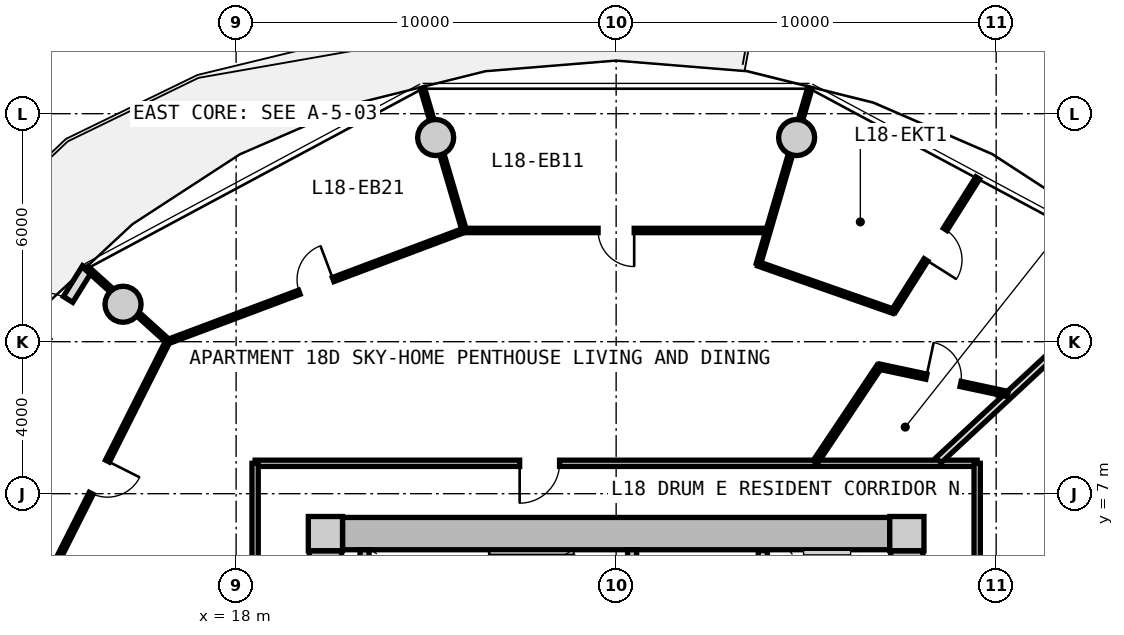
"""IFC4 building model, lengths in metres.
Left out: names, types, materials, properties, quantities, classifications, styles, units other than length and angle.
Written with IfcOpenShell. Run it as: python <this file> out.ifc"""

import sys

from ifc_helpers import new_model, si_unit, direction, frame, frame_2d, origin, origin_2d, place, context, subcontext, project, spatial, rectangle, circle, extrude, source, transform, mapped, element, fill, save


model = new_model("IFC4")
c1 = context("Model", 3, precision=1e-05, world=origin(), true_north=direction((0.0, 1.0)))
c2 = subcontext(c1, "Body", "Model", "MODEL_VIEW")
j1 = project(units=[si_unit("LENGTHUNIT", "METRE"), si_unit("PLANEANGLEUNIT", "RADIAN")], contexts=[c1])
p1 = place(None, origin())
s1 = spatial("IfcSite", under=j1, at=p1, CompositionType="ELEMENT")
p2 = place(p1, origin())
s2 = spatial("IfcBuilding", under=s1, at=p2, CompositionType="ELEMENT")
p3 = place(p2, frame((0.0, 0.0, 61.25)))
s3 = spatial("IfcBuildingStorey", under=s2, at=p3, CompositionType="ELEMENT", Elevation=61.25)
m1 = source(origin(), c2, "Body", "SweptSolid", [
    extrude(rectangle(XDim=0.9, YDim=0.9, at=origin_2d()), origin(), (0.0, 0.0, 1.0), 3.05),
])
for number, where, z_axis, x_axis in (
    (1, (35.65, 5.95, 0.0), (0.0, 0.0, 1.0), (1.0, 0.0, 0.0)),
    (2, (20.35, 5.95, 0.0), (0.0, 0.0, 1.0), (1.0, 0.0, 0.0)),
):
    element("IfcColumn", number, at=place(p3, frame(where, z_axis=z_axis, x_axis=x_axis)), inside=s3, PredefinedType="COLUMN", context=c2, shape_type="MappedRepresentation", body=[
        mapped(m1, transform((0.0, 0.0, 0.0), x_axis=(1.0, 0.0, 0.0), y_axis=(0.0, 1.0, 0.0), z_axis=(0.0, 0.0, 1.0), scale=1.0)),
    ])
m2 = source(origin(), c2, "Body", "SweptSolid", [
    extrude(rectangle(XDim=14.4, YDim=0.85, at=frame_2d((7.2, 0.0))), origin(), (0.0, 0.0, 1.0), 2.79),
])
p4 = place(p3, frame((20.8, 5.95, 0.0), z_axis=(0.0, 0.0, 1.0), x_axis=(1.0, 0.0, 0.0)))
e3 = element("IfcWall", 3, at=p4, inside=s3, PredefinedType="SHEAR", context=c2, shape_type="MappedRepresentation", body=[
    mapped(m2, transform((0.0, 0.0, 0.0), x_axis=(1.0, 0.0, 0.0), y_axis=(0.0, 1.0, 0.0), z_axis=(0.0, 0.0, 1.0), scale=1.0)),
])
m3 = source(origin(), c2, "Body", "SweptSolid", [
    extrude(rectangle(XDim=11.0, YDim=0.85, at=frame_2d((5.5, 0.0))), origin(), (0.0, 0.0, 1.0), 2.79),
])
p5 = place(p3, frame((20.35, -5.5, 0.0), z_axis=(0.0, 0.0, 1.0), x_axis=(0.0, 1.0, 0.0)))
e4 = element("IfcWall", 4, at=p5, inside=s3, PredefinedType="SHEAR", context=c2, shape_type="MappedRepresentation", body=[
    mapped(m3, transform((0.0, 0.0, 0.0), x_axis=(1.0, 0.0, 0.0), y_axis=(0.0, 1.0, 0.0), z_axis=(0.0, 0.0, 1.0), scale=1.0)),
])
p6 = place(p5, frame((3.8, 0.0, 0.0)))
e5 = element("IfcOpeningElement", 5, at=p6, cuts=e4, PredefinedType="OPENING", context=c2, shape_type="SweptSolid", body=[
    extrude(rectangle(XDim=1.2, YDim=2.15, at=frame_2d((0.6, 1.075))), frame((0.0, 0.435, 0.0), z_axis=(0.0, -1.0, 0.0), x_axis=(1.0, 0.0, 0.0)), (0.0, 0.0, 1.0), 0.87),
])
p7 = place(p3, frame((35.65, 5.5, 0.0), z_axis=(0.0, 0.0, 1.0), x_axis=(0.0, -1.0, 0.0)))
e6 = element("IfcWall", 6, at=p7, inside=s3, PredefinedType="SHEAR", context=c2, shape_type="MappedRepresentation", body=[
    mapped(m3, transform((0.0, 0.0, 0.0), x_axis=(1.0, 0.0, 0.0), y_axis=(0.0, 1.0, 0.0), z_axis=(0.0, 0.0, 1.0), scale=1.0)),
])
p8 = place(p7, frame((5.65, 0.0, 0.0)))
e7 = element("IfcOpeningElement", 7, at=p8, cuts=e6, PredefinedType="OPENING", context=c2, shape_type="SweptSolid", body=[
    extrude(rectangle(XDim=1.2, YDim=2.15, at=frame_2d((0.6, 1.075))), frame((0.0, 0.435, 0.0), z_axis=(0.0, -1.0, 0.0), x_axis=(1.0, 0.0, 0.0)), (0.0, 0.0, 1.0), 0.87),
])
m4 = source(origin(), c2, "Body", "SweptSolid", [
    extrude(circle(Radius=0.475, at=origin_2d()), origin(), (0.0, 0.0, 1.0), 3.05),
])
for number, where, z_axis, x_axis in (
    (8, (32.749, 16.373, 0.0), (0.0, 0.0, 1.0), (1.0, 0.0, 0.0)),
    (9, (23.251, 16.373, 0.0), (0.0, 0.0, 1.0), (1.0, 0.0, 0.0)),
    (10, (15.025, 11.985, 0.0), (0.0, 0.0, 1.0), (1.0, 0.0, 0.0)),
):
    element("IfcColumn", number, at=place(p3, frame(where, z_axis=z_axis, x_axis=x_axis)), inside=s3, PredefinedType="COLUMN", context=c2, shape_type="MappedRepresentation", body=[
        mapped(m4, transform((0.0, 0.0, 0.0), x_axis=(1.0, 0.0, 0.0), y_axis=(0.0, 1.0, 0.0), z_axis=(0.0, 0.0, 1.0), scale=1.0)),
    ])
m5 = source(origin(), c2, "Body", "SweptSolid", [
    extrude(rectangle(XDim=9.649, YDim=0.29, at=frame_2d((4.824, 0.0))), origin(), (0.0, 0.0, 1.0), 2.79),
])
p9 = place(p3, frame((8.99, 4.731, 0.0), z_axis=(0.0, 0.0, 1.0), x_axis=(0.527909458386, 0.849300655684, 0.0)))
e11 = element("IfcWall", 11, at=p9, inside=s3, PredefinedType="SOLIDWALL", context=c2, shape_type="MappedRepresentation", body=[
    mapped(m5, transform((0.0, 0.0, 0.0), x_axis=(1.0, 0.0, 0.0), y_axis=(0.0, 1.0, 0.0), z_axis=(0.0, 0.0, 1.0), scale=1.0)),
])
p10 = place(p9, frame((7.54, 0.0, 0.0)))
e12 = element("IfcOpeningElement", 12, at=p10, cuts=e11, PredefinedType="OPENING", context=c2, shape_type="SweptSolid", body=[
    extrude(rectangle(XDim=1.15, YDim=2.25, at=frame_2d((0.575, 1.125))), frame((0.0, 0.155, 0.0), z_axis=(0.0, -1.0, 0.0), x_axis=(1.0, 0.0, 0.0)), (0.0, 0.0, 1.0), 0.31),
])
p11 = place(p9, frame((0.85, 0.0, 0.85)))
e13 = element("IfcOpeningElement", 13, at=p11, cuts=e11, PredefinedType="OPENING", context=c2, shape_type="SweptSolid", body=[
    extrude(rectangle(XDim=1.2, YDim=1.5, at=frame_2d((0.6, 0.75))), frame((0.0, 0.155, 0.0), z_axis=(0.0, -1.0, 0.0), x_axis=(1.0, 0.0, 0.0)), (0.0, 0.0, 1.0), 0.31),
])
m6 = source(origin(), c2, "Body", "SweptSolid", [
    extrude(rectangle(XDim=3.075, YDim=0.24, at=frame_2d((1.538, 0.0))), origin(), (0.0, 0.0, 1.0), 2.79),
])
p12 = place(p3, frame((21.38, 2.45, 0.0), z_axis=(0.0, 0.0, 1.0), x_axis=(0.0, 1.0, 0.0)))
e14 = element("IfcWall", 14, at=p12, inside=s3, PredefinedType="PARTITIONING", context=c2, shape_type="MappedRepresentation", body=[
    mapped(m6, transform((0.0, 0.0, 0.0), x_axis=(1.0, 0.0, 0.0), y_axis=(0.0, 1.0, 0.0), z_axis=(0.0, 0.0, 1.0), scale=1.0)),
])
p13 = place(p3, frame((28.42, 2.45, 0.0), z_axis=(0.0, 0.0, 1.0), x_axis=(0.0, 1.0, 0.0)))
e15 = element("IfcWall", 15, at=p13, inside=s3, PredefinedType="PARTITIONING", context=c2, shape_type="MappedRepresentation", body=[
    mapped(m6, transform((0.0, 0.0, 0.0), x_axis=(1.0, 0.0, 0.0), y_axis=(0.0, 1.0, 0.0), z_axis=(0.0, 0.0, 1.0), scale=1.0)),
])
p14 = place(p13, frame((0.55, 0.0, 0.0)))
e16 = element("IfcOpeningElement", 16, at=p14, cuts=e15, PredefinedType="OPENING", context=c2, shape_type="SweptSolid", body=[
    extrude(rectangle(XDim=1.1, YDim=2.15, at=frame_2d((0.55, 1.075))), frame((0.0, 0.13, 0.0), z_axis=(0.0, -1.0, 0.0), x_axis=(1.0, 0.0, 0.0)), (0.0, 0.0, 1.0), 0.26),
])
m7 = source(origin(), c2, "Body", "SweptSolid", [
    extrude(rectangle(XDim=5.0, YDim=0.24, at=frame_2d((2.5, 0.0))), origin(), (0.0, 0.0, 1.0), 2.775),
])
p15 = place(p3, frame((31.86, 0.5, 0.0), z_axis=(0.0, 0.0, 1.0), x_axis=(0.0, 1.0, 0.0)))
e17 = element("IfcWall", 17, at=p15, inside=s3, PredefinedType="PARTITIONING", context=c2, shape_type="MappedRepresentation", body=[
    mapped(m7, transform((0.0, 0.0, 0.0), x_axis=(1.0, 0.0, 0.0), y_axis=(0.0, 1.0, 0.0), z_axis=(0.0, 0.0, 1.0), scale=1.0)),
])
p16 = place(p15, frame((3.05, 0.0, 0.0)))
e18 = element("IfcOpeningElement", 18, at=p16, cuts=e17, PredefinedType="OPENING", context=c2, shape_type="SweptSolid", body=[
    extrude(rectangle(XDim=1.3, YDim=2.2, at=frame_2d((0.65, 1.1))), frame((0.0, 0.13, 0.0), z_axis=(0.0, -1.0, 0.0), x_axis=(1.0, 0.0, 0.0)), (0.0, 0.0, 1.0), 0.26),
])
p17 = place(p15, frame((0.55, 0.0, 0.0)))
e19 = element("IfcOpeningElement", 19, at=p17, cuts=e17, PredefinedType="OPENING", context=c2, shape_type="SweptSolid", body=[
    extrude(rectangle(XDim=1.3, YDim=2.2, at=frame_2d((0.65, 1.1))), frame((0.0, 0.13, 0.0), z_axis=(0.0, -1.0, 0.0), x_axis=(1.0, 0.0, 0.0)), (0.0, 0.0, 1.0), 0.26),
])
m8 = source(origin(), c2, "Body", "SweptSolid", [
    extrude(rectangle(XDim=19.0, YDim=0.165, at=frame_2d((9.5, 0.0))), origin(), (0.0, 0.0, 1.0), 2.775),
])
p18 = place(p3, frame((18.5, 7.8, 0.0), z_axis=(0.0, 0.0, 1.0), x_axis=(1.0, 0.0, 0.0)))
e20 = element("IfcWall", 20, at=p18, inside=s3, PredefinedType="PARTITIONING", context=c2, shape_type="MappedRepresentation", body=[
    mapped(m8, transform((0.0, 0.0, 0.0), x_axis=(1.0, 0.0, 0.0), y_axis=(0.0, 1.0, 0.0), z_axis=(0.0, 0.0, 1.0), scale=1.0)),
])
p19 = place(p18, frame((6.961, 0.0, 0.0)))
e21 = element("IfcOpeningElement", 21, at=p19, cuts=e20, PredefinedType="OPENING", context=c2, shape_type="SweptSolid", body=[
    extrude(rectangle(XDim=1.05, YDim=2.15, at=frame_2d((0.525, 1.075))), frame((0.0, 0.093, 0.0), z_axis=(0.0, -1.0, 0.0), x_axis=(1.0, 0.0, 0.0)), (0.0, 0.0, 1.0), 0.185),
])
m9 = source(origin(), c2, "Body", "SweptSolid", [
    extrude(rectangle(XDim=15.6, YDim=0.165, at=frame_2d((7.8, 0.0))), origin(), (0.0, 0.0, 1.0), 2.775),
])
p20 = place(p3, frame((18.5, -7.8, 0.0), z_axis=(0.0, 0.0, 1.0), x_axis=(0.0, 1.0, 0.0)))
e22 = element("IfcWall", 22, at=p20, inside=s3, PredefinedType="PARTITIONING", context=c2, shape_type="MappedRepresentation", body=[
    mapped(m9, transform((0.0, 0.0, 0.0), x_axis=(1.0, 0.0, 0.0), y_axis=(0.0, 1.0, 0.0), z_axis=(0.0, 0.0, 1.0), scale=1.0)),
])
p21 = place(p20, frame((3.63, 0.0, 0.0)))
e23 = element("IfcOpeningElement", 23, at=p21, cuts=e22, PredefinedType="OPENING", context=c2, shape_type="SweptSolid", body=[
    extrude(rectangle(XDim=1.05, YDim=2.15, at=frame_2d((0.525, 1.075))), frame((0.0, 0.093, 0.0), z_axis=(0.0, -1.0, 0.0), x_axis=(1.0, 0.0, 0.0)), (0.0, 0.0, 1.0), 0.185),
])
p22 = place(p3, frame((37.5, 7.8, 0.0), z_axis=(0.0, 0.0, 1.0), x_axis=(0.0, -1.0, 0.0)))
e24 = element("IfcWall", 24, at=p22, inside=s3, PredefinedType="PARTITIONING", context=c2, shape_type="MappedRepresentation", body=[
    mapped(m9, transform((0.0, 0.0, 0.0), x_axis=(1.0, 0.0, 0.0), y_axis=(0.0, 1.0, 0.0), z_axis=(0.0, 0.0, 1.0), scale=1.0)),
])
p23 = place(p22, frame((7.275, 0.0, 0.0)))
e25 = element("IfcOpeningElement", 25, at=p23, cuts=e24, PredefinedType="OPENING", context=c2, shape_type="SweptSolid", body=[
    extrude(rectangle(XDim=1.05, YDim=2.15, at=frame_2d((0.525, 1.075))), frame((0.0, 0.093, 0.0), z_axis=(0.0, -1.0, 0.0), x_axis=(1.0, 0.0, 0.0)), (0.0, 0.0, 1.0), 0.185),
])
m10 = source(origin(), c2, "Body", "SweptSolid", [
    extrude(rectangle(XDim=7.435, YDim=0.19, at=frame_2d((3.717, 0.0))), origin(), (0.0, 0.0, 1.0), 2.225),
])
p24 = place(p3, frame((36.483, 7.88, 0.0), z_axis=(0.0, 0.0, 1.0), x_axis=(0.732651956848, 0.680603489652, 0.0)))
e26 = element("IfcWall", 26, at=p24, inside=s3, PredefinedType="PARTITIONING", context=c2, shape_type="MappedRepresentation", body=[
    mapped(m10, transform((0.0, 0.0, 0.0), x_axis=(1.0, 0.0, 0.0), y_axis=(0.0, 1.0, 0.0), z_axis=(0.0, 0.0, 1.0), scale=1.0)),
])
m11 = source(origin(), c2, "Body", "SweptSolid", [
    extrude(rectangle(XDim=7.993, YDim=0.115, at=frame_2d((3.996, 0.0))), origin(), (0.0, 0.0, 1.0), 2.775),
])
p25 = place(p3, frame((31.996, 13.927, 0.0), z_axis=(0.0, 0.0, 1.0), x_axis=(-1.0, 0.0, 0.0)))
e27 = element("IfcWall", 27, at=p25, inside=s3, PredefinedType="PARTITIONING", context=c2, shape_type="MappedRepresentation", body=[
    mapped(m11, transform((0.0, 0.0, 0.0), x_axis=(1.0, 0.0, 0.0), y_axis=(0.0, 1.0, 0.0), z_axis=(0.0, 0.0, 1.0), scale=1.0)),
])
p26 = place(p25, frame((3.521, 0.0, 0.0)))
e28 = element("IfcOpeningElement", 28, at=p26, cuts=e27, PredefinedType="OPENING", context=c2, shape_type="SweptSolid", body=[
    extrude(rectangle(XDim=0.95, YDim=2.1, at=frame_2d((0.475, 1.05))), frame((0.0, 0.067, 0.0), z_axis=(0.0, -1.0, 0.0), x_axis=(1.0, 0.0, 0.0)), (0.0, 0.0, 1.0), 0.135),
])
m12 = source(origin(), c2, "Body", "SweptSolid", [
    extrude(rectangle(XDim=4.829, YDim=0.115, at=frame_2d((2.415, 0.0))), origin(), (0.0, 0.0, 1.0), 2.225),
])
p27 = place(p3, frame((31.742, 13.042, 0.0), z_axis=(0.0, 0.0, 1.0), x_axis=(0.280838556456, 0.959755023539, 0.0)))
e29 = element("IfcWall", 29, at=p27, inside=s3, PredefinedType="PARTITIONING", context=c2, shape_type="MappedRepresentation", body=[
    mapped(m12, transform((0.0, 0.0, 0.0), x_axis=(1.0, 0.0, 0.0), y_axis=(0.0, 1.0, 0.0), z_axis=(0.0, 0.0, 1.0), scale=1.0)),
])
m13 = source(origin(), c2, "Body", "SweptSolid", [
    extrude(rectangle(XDim=8.32, YDim=0.115, at=frame_2d((4.16, 0.0))), origin(), (0.0, 0.0, 1.0), 2.775),
])
p28 = place(p3, frame((24.003, 13.93, 0.0), z_axis=(0.0, 0.0, 1.0), x_axis=(-0.936180763098, -0.351518959382, 0.0)))
e30 = element("IfcWall", 30, at=p28, inside=s3, PredefinedType="PARTITIONING", context=c2, shape_type="MappedRepresentation", body=[
    mapped(m13, transform((0.0, 0.0, 0.0), x_axis=(1.0, 0.0, 0.0), y_axis=(0.0, 1.0, 0.0), z_axis=(0.0, 0.0, 1.0), scale=1.0)),
])
p29 = place(p28, frame((3.685, 0.0, 0.0)))
e31 = element("IfcOpeningElement", 31, at=p29, cuts=e30, PredefinedType="OPENING", context=c2, shape_type="SweptSolid", body=[
    extrude(rectangle(XDim=0.95, YDim=2.1, at=frame_2d((0.475, 1.05))), frame((0.0, 0.067, 0.0), z_axis=(0.0, -1.0, 0.0), x_axis=(1.0, 0.0, 0.0)), (0.0, 0.0, 1.0), 0.135),
])
m14 = source(origin(), c2, "Body", "SweptSolid", [
    extrude(rectangle(XDim=3.905, YDim=0.115, at=frame_2d((1.952, 0.0))), origin(), (0.0, 0.0, 1.0), 2.225),
])
p30 = place(p3, frame((24.003, 13.93, 0.0), z_axis=(0.0, 0.0, 1.0), x_axis=(-0.282037692958, 0.959403324859, 0.0)))
e32 = element("IfcWall", 32, at=p30, inside=s3, PredefinedType="PARTITIONING", context=c2, shape_type="MappedRepresentation", body=[
    mapped(m14, transform((0.0, 0.0, 0.0), x_axis=(1.0, 0.0, 0.0), y_axis=(0.0, 1.0, 0.0), z_axis=(0.0, 0.0, 1.0), scale=1.0)),
])
m15 = source(origin(), c2, "Body", "SweptSolid", [
    extrude(rectangle(XDim=8.018, YDim=0.115, at=frame_2d((4.009, 0.0))), origin(), (0.0, 0.0, 1.0), 2.775),
])
p31 = place(p3, frame((16.205, 11.014, 0.0), z_axis=(0.0, 0.0, 1.0), x_axis=(-0.450134355233, -0.89296084026, 0.0)))
e33 = element("IfcWall", 33, at=p31, inside=s3, PredefinedType="PARTITIONING", context=c2, shape_type="MappedRepresentation", body=[
    mapped(m15, transform((0.0, 0.0, 0.0), x_axis=(1.0, 0.0, 0.0), y_axis=(0.0, 1.0, 0.0), z_axis=(0.0, 0.0, 1.0), scale=1.0)),
])
p32 = place(p31, frame((3.534, 0.0, 0.0)))
e34 = element("IfcOpeningElement", 34, at=p32, cuts=e33, PredefinedType="OPENING", context=c2, shape_type="SweptSolid", body=[
    extrude(rectangle(XDim=0.95, YDim=2.1, at=frame_2d((0.475, 1.05))), frame((0.0, 0.067, 0.0), z_axis=(0.0, -1.0, 0.0), x_axis=(1.0, 0.0, 0.0)), (0.0, 0.0, 1.0), 0.135),
])
m16 = source(origin(), c2, "Body", "SweptSolid", [
    extrude(rectangle(XDim=2.875, YDim=0.115, at=frame_2d((1.438, 0.0))), origin(), (0.0, 0.0, 1.0), 2.225),
])
p33 = place(p3, frame((16.205, 11.014, 0.0), z_axis=(0.0, 0.0, 1.0), x_axis=(-0.742512588127, 0.669832110661, 0.0)))
e35 = element("IfcWall", 35, at=p33, inside=s3, PredefinedType="PARTITIONING", context=c2, shape_type="MappedRepresentation", body=[
    mapped(m16, transform((0.0, 0.0, 0.0), x_axis=(1.0, 0.0, 0.0), y_axis=(0.0, 1.0, 0.0), z_axis=(0.0, 0.0, 1.0), scale=1.0)),
])
m17 = source(origin(), c2, "Body", "SweptSolid", [
    extrude(rectangle(XDim=3.025, YDim=0.14, at=frame_2d((1.513, 0.0))), origin(), (0.0, 0.0, 1.0), 2.775),
])
p34 = place(p3, frame((33.24, 7.83, 0.0), z_axis=(0.0, 0.0, 1.0), x_axis=(0.556189165904, 0.831055721195, 0.0)))
e36 = element("IfcWall", 36, at=p34, inside=s3, PredefinedType="PARTITIONING", context=c2, shape_type="MappedRepresentation", body=[
    mapped(m17, transform((0.0, 0.0, 0.0), x_axis=(1.0, 0.0, 0.0), y_axis=(0.0, 1.0, 0.0), z_axis=(0.0, 0.0, 1.0), scale=1.0)),
])
m18 = source(origin(), c2, "Body", "SweptSolid", [
    extrude(rectangle(XDim=3.459, YDim=0.14, at=frame_2d((1.729, 0.0))), origin(), (0.0, 0.0, 1.0), 2.775),
])
p35 = place(p3, frame((34.922, 10.344, 0.0), z_axis=(0.0, 0.0, 1.0), x_axis=(0.978006468578, -0.208574560815, 0.0)))
e37 = element("IfcWall", 37, at=p35, inside=s3, PredefinedType="PARTITIONING", context=c2, shape_type="MappedRepresentation", body=[
    mapped(m18, transform((0.0, 0.0, 0.0), x_axis=(1.0, 0.0, 0.0), y_axis=(0.0, 1.0, 0.0), z_axis=(0.0, 0.0, 1.0), scale=1.0)),
])
p36 = place(p35, frame((1.27, 0.0, 0.0)))
e38 = element("IfcOpeningElement", 38, at=p36, cuts=e37, PredefinedType="OPENING", context=c2, shape_type="SweptSolid", body=[
    extrude(rectangle(XDim=0.92, YDim=2.1, at=frame_2d((0.46, 1.05))), frame((0.0, 0.08, 0.0), z_axis=(0.0, -1.0, 0.0), x_axis=(1.0, 0.0, 0.0)), (0.0, 0.0, 1.0), 0.16),
])
m19 = source(origin(), c2, "Body", "SweptSolid", [
    extrude(rectangle(XDim=4.15, YDim=0.115, at=frame_2d((2.075, 0.0))), origin(), (0.0, 0.0, 1.0), 2.775),
])
p37 = place(p3, frame((35.296, 11.801, 0.0), z_axis=(0.0, 0.0, 1.0), x_axis=(0.534475378192, 0.845184045109, 0.0)))
e39 = element("IfcWall", 39, at=p37, inside=s3, PredefinedType="PARTITIONING", context=c2, shape_type="MappedRepresentation", body=[
    mapped(m19, transform((0.0, 0.0, 0.0), x_axis=(1.0, 0.0, 0.0), y_axis=(0.0, 1.0, 0.0), z_axis=(0.0, 0.0, 1.0), scale=1.0)),
])
p38 = place(p37, frame((1.6, 0.0, 0.0)))
e40 = element("IfcOpeningElement", 40, at=p38, cuts=e39, PredefinedType="OPENING", context=c2, shape_type="SweptSolid", body=[
    extrude(rectangle(XDim=0.95, YDim=2.1, at=frame_2d((0.475, 1.05))), frame((0.0, 0.067, 0.0), z_axis=(0.0, -1.0, 0.0), x_axis=(1.0, 0.0, 0.0)), (0.0, 0.0, 1.0), 0.135),
])
m20 = source(origin(), c2, "Body", "SweptSolid", [
    extrude(rectangle(XDim=3.765, YDim=0.115, at=frame_2d((1.882, 0.0))), origin(), (0.0, 0.0, 1.0), 2.775),
])
p39 = place(p3, frame((35.296, 11.801, 0.0), z_axis=(0.0, 0.0, 1.0), x_axis=(-0.943788572669, 0.330549739222, 0.0)))
e41 = element("IfcWall", 41, at=p39, inside=s3, PredefinedType="PARTITIONING", context=c2, shape_type="MappedRepresentation", body=[
    mapped(m20, transform((0.0, 0.0, 0.0), x_axis=(1.0, 0.0, 0.0), y_axis=(0.0, 1.0, 0.0), z_axis=(0.0, 0.0, 1.0), scale=1.0)),
])
m21 = source(origin(), c2, "Body", "SweptSolid", [
    extrude(rectangle(XDim=1.15, YDim=2.25, at=frame_2d((0.575, 1.125))), frame((0.0, 0.025, 0.0), z_axis=(0.0, -1.0, 0.0), x_axis=(1.0, 0.0, 0.0)), (0.0, 0.0, 1.0), 0.05),
])
p40 = place(p10, origin())
e42 = element("IfcDoor", 42, at=p40, inside=s3, OperationType="SINGLE_SWING_LEFT", PredefinedType="DOOR", context=c2, shape_type="MappedRepresentation", body=[
    mapped(m21, transform((0.0, 0.0, 0.0), x_axis=(1.0, 0.0, 0.0), y_axis=(0.0, 1.0, 0.0), z_axis=(0.0, 0.0, 1.0), scale=1.0)),
])
fill(e12, e42)
m22 = source(origin(), c2, "Body", "SweptSolid", [
    extrude(rectangle(XDim=1.05, YDim=2.15, at=frame_2d((0.525, 1.075))), frame((0.0, 0.025, 0.0), z_axis=(0.0, -1.0, 0.0), x_axis=(1.0, 0.0, 0.0)), (0.0, 0.0, 1.0), 0.05),
])
p41 = place(p19, frame((1.05, 0.0, 0.0), z_axis=(0.0, 0.0, 1.0), x_axis=(-1.0, 0.0, 0.0)))
e43 = element("IfcDoor", 43, at=p41, inside=s3, OperationType="SINGLE_SWING_RIGHT", PredefinedType="DOOR", context=c2, shape_type="MappedRepresentation", body=[
    mapped(m22, transform((0.0, 0.0, 0.0), x_axis=(1.0, 0.0, 0.0), y_axis=(0.0, 1.0, 0.0), z_axis=(0.0, 0.0, 1.0), scale=1.0)),
])
fill(e21, e43)
m23 = source(origin(), c2, "Body", "SweptSolid", [
    extrude(rectangle(XDim=0.92, YDim=2.1, at=frame_2d((0.46, 1.05))), frame((0.0, 0.025, 0.0), z_axis=(0.0, -1.0, 0.0), x_axis=(1.0, 0.0, 0.0)), (0.0, 0.0, 1.0), 0.05),
])
p42 = place(p36, origin())
e44 = element("IfcDoor", 44, at=p42, inside=s3, OperationType="SINGLE_SWING_LEFT", PredefinedType="DOOR", context=c2, shape_type="MappedRepresentation", body=[
    mapped(m23, transform((0.0, 0.0, 0.0), x_axis=(1.0, 0.0, 0.0), y_axis=(0.0, 1.0, 0.0), z_axis=(0.0, 0.0, 1.0), scale=1.0)),
])
fill(e38, e44)
m24 = source(origin(), c2, "Body", "SweptSolid", [
    extrude(rectangle(XDim=0.95, YDim=2.1, at=frame_2d((0.475, 1.05))), frame((0.0, 0.025, 0.0), z_axis=(0.0, -1.0, 0.0), x_axis=(1.0, 0.0, 0.0)), (0.0, 0.0, 1.0), 0.05),
])
p43 = place(p38, frame((0.95, 0.0, 0.0), z_axis=(0.0, 0.0, 1.0), x_axis=(-1.0, 0.0, 0.0)))
e45 = element("IfcDoor", 45, at=p43, inside=s3, OperationType="SINGLE_SWING_RIGHT", PredefinedType="DOOR", context=c2, shape_type="MappedRepresentation", body=[
    mapped(m24, transform((0.0, 0.0, 0.0), x_axis=(1.0, 0.0, 0.0), y_axis=(0.0, 1.0, 0.0), z_axis=(0.0, 0.0, 1.0), scale=1.0)),
])
fill(e40, e45)
p44 = place(p26, origin())
e46 = element("IfcDoor", 46, at=p44, inside=s3, OperationType="SINGLE_SWING_LEFT", PredefinedType="DOOR", context=c2, shape_type="MappedRepresentation", body=[
    mapped(m24, transform((0.0, 0.0, 0.0), x_axis=(1.0, 0.0, 0.0), y_axis=(0.0, 1.0, 0.0), z_axis=(0.0, 0.0, 1.0), scale=1.0)),
])
fill(e28, e46)
p45 = place(p29, frame((0.95, 0.0, 0.0), z_axis=(0.0, 0.0, 1.0), x_axis=(-1.0, 0.0, 0.0)))
e47 = element("IfcDoor", 47, at=p45, inside=s3, OperationType="SINGLE_SWING_RIGHT", PredefinedType="DOOR", context=c2, shape_type="MappedRepresentation", body=[
    mapped(m24, transform((0.0, 0.0, 0.0), x_axis=(1.0, 0.0, 0.0), y_axis=(0.0, 1.0, 0.0), z_axis=(0.0, 0.0, 1.0), scale=1.0)),
])
fill(e31, e47)
p46 = place(p32, origin())
e48 = element("IfcDoor", 48, at=p46, inside=s3, OperationType="SINGLE_SWING_LEFT", PredefinedType="DOOR", context=c2, shape_type="MappedRepresentation", body=[
    mapped(m24, transform((0.0, 0.0, 0.0), x_axis=(1.0, 0.0, 0.0), y_axis=(0.0, 1.0, 0.0), z_axis=(0.0, 0.0, 1.0), scale=1.0)),
])
fill(e34, e48)
save(model, sys.argv[1])
